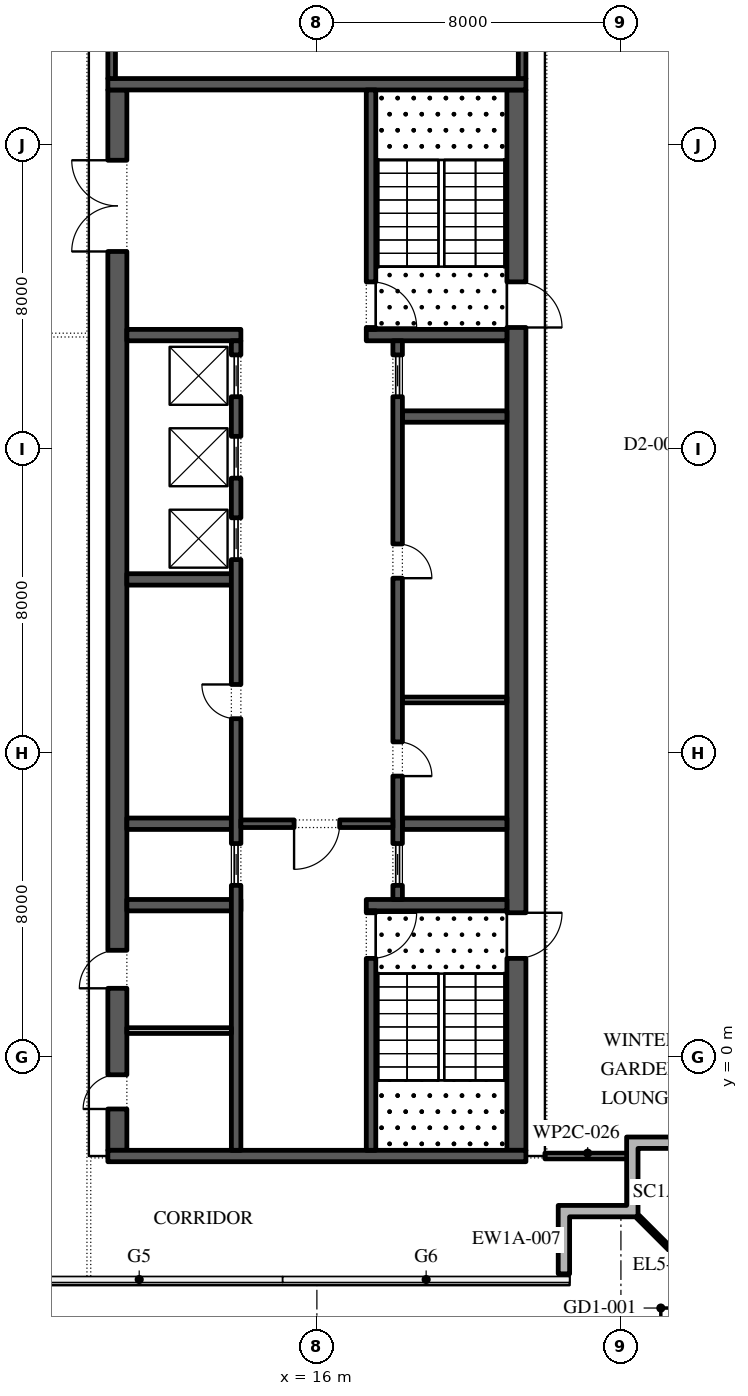
"""IFC4 building model, lengths in metres.
Left out: names, types, materials, properties, quantities, classifications, styles, units other than length and angle.
Written with IfcOpenShell. Run it as: python <this file> out.ifc"""

import sys

from ifc_helpers import new_model, si_unit, direction, frame, frame_2d, origin, place, context, subcontext, project, spatial, polyline, rectangle, outline, extrude, element, fill, save


model = new_model("IFC4")
c1 = context("Model", 3, precision=1e-05, world=origin(), true_north=direction((0.0, 1.0)))
c2 = subcontext(c1, "Body", "Model", "MODEL_VIEW")
j1 = project(units=[si_unit("LENGTHUNIT", "METRE"), si_unit("PLANEANGLEUNIT", "RADIAN")], contexts=[c1])
p1 = place(None, origin())
s1 = spatial("IfcSite", under=j1, at=p1, CompositionType="ELEMENT")
p2 = place(p1, origin())
s2 = spatial("IfcBuilding", under=s1, at=p2, CompositionType="ELEMENT")
p3 = place(p2, frame((0.0, 0.0, 303.0)))
s3 = spatial("IfcBuildingStorey", under=s2, at=p3, CompositionType="ELEMENT", Elevation=303.0)
p4 = place(p3, origin())
e1 = element("IfcWall", 1, at=p4, inside=s3, PredefinedType="STANDARD", context=c2, shape_type="SweptSolid", body=[
    extrude(outline(polyline([(24.15, -3.9), (24.15, -2.1), (26.25, -2.1), (26.25, -2.4), (24.45, -2.4), (24.45, -4.2), (22.65, -4.2), (22.65, -5.7), (22.35, -5.7), (22.35, -3.9), (24.15, -3.9)])), origin(), (0.0, 0.0, 1.0), 5.8),
])
p5 = place(p3, frame((24.45, -4.2, 0.0), z_axis=(0.0, 0.0, 1.0), x_axis=(0.707106781187, -0.707106781187, 0.0)))
e2 = element("IfcWall", 2, at=p5, inside=s3, PredefinedType="STANDARD", context=c2, shape_type="SweptSolid", body=[
    extrude(rectangle(XDim=2.667, YDim=0.1, at=frame_2d((1.333, 0.0))), origin(), (0.0, 0.0, 1.0), 5.8),
])
p6 = place(p3, frame((21.25, -2.45, 0.0), z_axis=(0.0, 0.0, 1.0), x_axis=(0.0, 1.0, 0.0)))
e3 = element("IfcWall", 3, at=p6, inside=s3, PredefinedType="SHEAR", context=c2, shape_type="SweptSolid", body=[
    extrude(rectangle(XDim=27.9, YDim=0.5, at=frame_2d((13.95, 0.0))), origin(), (0.0, 0.0, 1.0), 5.8),
])
p7 = place(p6, frame((5.05, 0.0, 0.0)))
e4 = element("IfcOpeningElement", 4, at=p7, cuts=e3, PredefinedType="OPENING", context=c2, shape_type="SweptSolid", body=[
    extrude(rectangle(XDim=1.2, YDim=2.1, at=frame_2d((0.6, 1.05))), frame((0.0, 0.26, 0.0), z_axis=(0.0, -1.0, 0.0), x_axis=(1.0, 0.0, 0.0)), (0.0, 0.0, 1.0), 0.52),
])
p8 = place(p6, frame((21.65, 0.0, 0.0)))
e5 = element("IfcOpeningElement", 5, at=p8, cuts=e3, PredefinedType="OPENING", context=c2, shape_type="SweptSolid", body=[
    extrude(rectangle(XDim=1.2, YDim=2.1, at=frame_2d((0.6, 1.05))), frame((0.0, 0.26, 0.0), z_axis=(0.0, -1.0, 0.0), x_axis=(1.0, 0.0, 0.0)), (0.0, 0.0, 1.0), 0.52),
])
p9 = place(p3, frame((10.75, -2.45, 0.0), z_axis=(0.0, 0.0, 1.0), x_axis=(0.0, 1.0, 0.0)))
e6 = element("IfcWall", 6, at=p9, inside=s3, PredefinedType="SHEAR", context=c2, shape_type="SweptSolid", body=[
    extrude(rectangle(XDim=27.9, YDim=0.5, at=frame_2d((13.95, 0.0))), origin(), (0.0, 0.0, 1.0), 5.8),
])
p10 = place(p9, frame((23.65, 0.0, 0.0)))
e7 = element("IfcOpeningElement", 7, at=p10, cuts=e6, PredefinedType="OPENING", context=c2, shape_type="SweptSolid", body=[
    extrude(rectangle(XDim=2.4, YDim=2.1, at=frame_2d((1.2, 1.05))), frame((0.0, 0.26, 0.0), z_axis=(0.0, -1.0, 0.0), x_axis=(1.0, 0.0, 0.0)), (0.0, 0.0, 1.0), 0.52),
])
p11 = place(p9, frame((1.087, 0.0, 0.0)))
e8 = element("IfcOpeningElement", 8, at=p11, cuts=e6, PredefinedType="OPENING", context=c2, shape_type="SweptSolid", body=[
    extrude(rectangle(XDim=0.9, YDim=2.1, at=frame_2d((0.45, 1.05))), frame((0.0, 0.26, 0.0), z_axis=(0.0, -1.0, 0.0), x_axis=(1.0, 0.0, 0.0)), (0.0, 0.0, 1.0), 0.52),
])
p12 = place(p9, frame((4.262, 0.0, 0.0)))
e9 = element("IfcOpeningElement", 9, at=p12, cuts=e6, PredefinedType="OPENING", context=c2, shape_type="SweptSolid", body=[
    extrude(rectangle(XDim=1.0, YDim=2.1, at=frame_2d((0.5, 1.05))), frame((0.0, 0.26, 0.0), z_axis=(0.0, -1.0, 0.0), x_axis=(1.0, 0.0, 0.0)), (0.0, 0.0, 1.0), 0.52),
])
for number, where, z_axis, x_axis in (
    (10, (10.5, -2.6, 0.0), (0.0, 0.0, 1.0), (1.0, 0.0, 0.0)),
    (11, (10.5, 25.6, 0.0), (0.0, 0.0, 1.0), (1.0, 0.0, 0.0)),
):
    element("IfcWall", number, at=place(p3, frame(where, z_axis=z_axis, x_axis=x_axis)), inside=s3, PredefinedType="SHEAR", context=c2, shape_type="SweptSolid", body=[
        extrude(rectangle(XDim=11.0, YDim=0.3, at=frame_2d((5.5, 0.0))), origin(), (0.0, 0.0, 1.0), 5.8),
    ])
p13 = place(p3, frame((17.3, 4.0, 0.0), z_axis=(0.0, 0.0, 1.0), x_axis=(1.0, 0.0, 0.0)))
e12 = element("IfcWall", 12, at=p13, inside=s3, PredefinedType="SHEAR", context=c2, shape_type="SweptSolid", body=[
    extrude(rectangle(XDim=3.7, YDim=0.3, at=frame_2d((1.85, 0.0))), origin(), (0.0, 0.0, 1.0), 5.8),
])
p14 = place(p3, frame((17.425, -2.45, 0.0), z_axis=(0.0, 0.0, 1.0), x_axis=(0.0, 1.0, 0.0)))
e13 = element("IfcWall", 13, at=p14, inside=s3, PredefinedType="SHEAR", context=c2, shape_type="SweptSolid", body=[
    extrude(rectangle(XDim=6.3, YDim=0.25, at=frame_2d((3.15, 0.0))), origin(), (0.0, 0.0, 1.0), 5.8),
])
p15 = place(p14, frame((5.05, 0.0, 0.0)))
e14 = element("IfcOpeningElement", 14, at=p15, cuts=e13, PredefinedType="OPENING", context=c2, shape_type="SweptSolid", body=[
    extrude(rectangle(XDim=1.2, YDim=2.1, at=frame_2d((0.6, 1.05))), frame((0.0, 0.135, 0.0), z_axis=(0.0, -1.0, 0.0), x_axis=(1.0, 0.0, 0.0)), (0.0, 0.0, 1.0), 0.27),
])
p16 = place(p3, frame((17.3, 19.0, 0.0), z_axis=(0.0, 0.0, 1.0), x_axis=(1.0, 0.0, 0.0)))
e15 = element("IfcWall", 15, at=p16, inside=s3, PredefinedType="SHEAR", context=c2, shape_type="SweptSolid", body=[
    extrude(rectangle(XDim=3.7, YDim=0.3, at=frame_2d((1.85, 0.0))), origin(), (0.0, 0.0, 1.0), 5.8),
])
p17 = place(p3, frame((17.425, 19.15, 0.0), z_axis=(0.0, 0.0, 1.0), x_axis=(0.0, 1.0, 0.0)))
e16 = element("IfcWall", 16, at=p17, inside=s3, PredefinedType="SHEAR", context=c2, shape_type="SweptSolid", body=[
    extrude(rectangle(XDim=6.3, YDim=0.25, at=frame_2d((3.15, 0.0))), origin(), (0.0, 0.0, 1.0), 5.8),
])
p18 = place(p17, frame((0.05, 0.0, 0.0)))
e17 = element("IfcOpeningElement", 17, at=p18, cuts=e16, PredefinedType="OPENING", context=c2, shape_type="SweptSolid", body=[
    extrude(rectangle(XDim=1.2, YDim=2.1, at=frame_2d((0.6, 1.05))), frame((0.0, 0.135, 0.0), z_axis=(0.0, -1.0, 0.0), x_axis=(1.0, 0.0, 0.0)), (0.0, 0.0, 1.0), 0.27),
])
for number, where, z_axis, x_axis in (
    (18, (18.25, 6.143, 0.0), (0.0, 0.0, 1.0), (1.0, 0.0, 0.0)),
    (19, (18.25, 16.857, 0.0), (0.0, 0.0, 1.0), (1.0, 0.0, 0.0)),
):
    element("IfcWall", number, at=place(p3, frame(where, z_axis=z_axis, x_axis=x_axis)), inside=s3, PredefinedType="SHEAR", context=c2, shape_type="SweptSolid", body=[
        extrude(rectangle(XDim=2.75, YDim=0.3, at=frame_2d((1.375, 0.0))), origin(), (0.0, 0.0, 1.0), 5.8),
    ])
p19 = place(p3, frame((18.125, 4.15, 0.0), z_axis=(0.0, 0.0, 1.0), x_axis=(0.0, 1.0, 0.0)))
e20 = element("IfcWall", 20, at=p19, inside=s3, PredefinedType="SHEAR", context=c2, shape_type="SweptSolid", body=[
    extrude(rectangle(XDim=14.7, YDim=0.25, at=frame_2d((7.35, 0.0))), origin(), (0.0, 0.0, 1.0), 5.8),
])
p20 = place(p19, frame((3.246, 0.0, 0.0)))
e21 = element("IfcOpeningElement", 21, at=p20, cuts=e20, PredefinedType="OPENING", context=c2, shape_type="SweptSolid", body=[
    extrude(rectangle(XDim=0.9, YDim=2.1, at=frame_2d((0.45, 1.05))), frame((0.0, 0.135, 0.0), z_axis=(0.0, -1.0, 0.0), x_axis=(1.0, 0.0, 0.0)), (0.0, 0.0, 1.0), 0.27),
])
p21 = place(p19, frame((8.454, 0.0, 0.0)))
e22 = element("IfcOpeningElement", 22, at=p21, cuts=e20, PredefinedType="OPENING", context=c2, shape_type="SweptSolid", body=[
    extrude(rectangle(XDim=0.9, YDim=2.1, at=frame_2d((0.45, 1.05))), frame((0.0, 0.135, 0.0), z_axis=(0.0, -1.0, 0.0), x_axis=(1.0, 0.0, 0.0)), (0.0, 0.0, 1.0), 0.27),
])
p22 = place(p19, frame((0.371, 0.0, 0.0)))
e23 = element("IfcOpeningElement", 23, at=p22, cuts=e20, PredefinedType="OPENING", context=c2, shape_type="SweptSolid", body=[
    extrude(rectangle(XDim=1.1, YDim=2.1, at=frame_2d((0.55, 1.05))), frame((0.0, 0.135, 0.0), z_axis=(0.0, -1.0, 0.0), x_axis=(1.0, 0.0, 0.0)), (0.0, 0.0, 1.0), 0.27),
])
p23 = place(p19, frame((13.229, 0.0, 0.0)))
e24 = element("IfcOpeningElement", 24, at=p23, cuts=e20, PredefinedType="OPENING", context=c2, shape_type="SweptSolid", body=[
    extrude(rectangle(XDim=1.1, YDim=2.1, at=frame_2d((0.55, 1.05))), frame((0.0, 0.135, 0.0), z_axis=(0.0, -1.0, 0.0), x_axis=(1.0, 0.0, 0.0)), (0.0, 0.0, 1.0), 0.27),
])
p24 = place(p3, frame((18.25, 9.4, 0.0), z_axis=(0.0, 0.0, 1.0), x_axis=(1.0, 0.0, 0.0)))
e25 = element("IfcWall", 25, at=p24, inside=s3, PredefinedType="PARTITIONING", context=c2, shape_type="SweptSolid", body=[
    extrude(rectangle(XDim=2.75, YDim=0.15, at=frame_2d((1.375, 0.0))), origin(), (0.0, 0.0, 1.0), 5.8),
])
p25 = place(p3, frame((11.0, 4.0, 0.0), z_axis=(0.0, 0.0, 1.0), x_axis=(1.0, 0.0, 0.0)))
e26 = element("IfcWall", 26, at=p25, inside=s3, PredefinedType="SHEAR", context=c2, shape_type="SweptSolid", body=[
    extrude(rectangle(XDim=3.0, YDim=0.3, at=frame_2d((1.5, 0.0))), origin(), (0.0, 0.0, 1.0), 5.8),
])
for number, where, z_axis, x_axis in (
    (27, (11.0, 6.143, 0.0), (0.0, 0.0, 1.0), (1.0, 0.0, 0.0)),
    (28, (11.0, 12.571, 0.0), (0.0, 0.0, 1.0), (1.0, 0.0, 0.0)),
):
    element("IfcWall", number, at=place(p3, frame(where, z_axis=z_axis, x_axis=x_axis)), inside=s3, PredefinedType="SHEAR", context=c2, shape_type="SweptSolid", body=[
        extrude(rectangle(XDim=2.75, YDim=0.3, at=frame_2d((1.375, 0.0))), origin(), (0.0, 0.0, 1.0), 5.8),
    ])
p26 = place(p3, frame((11.0, 19.0, 0.0), z_axis=(0.0, 0.0, 1.0), x_axis=(1.0, 0.0, 0.0)))
e29 = element("IfcWall", 29, at=p26, inside=s3, PredefinedType="SHEAR", context=c2, shape_type="SweptSolid", body=[
    extrude(rectangle(XDim=3.0, YDim=0.3, at=frame_2d((1.5, 0.0))), origin(), (0.0, 0.0, 1.0), 5.8),
])
p27 = place(p3, frame((13.875, -2.45, 0.0), z_axis=(0.0, 0.0, 1.0), x_axis=(0.0, 1.0, 0.0)))
e30 = element("IfcWall", 30, at=p27, inside=s3, PredefinedType="SHEAR", context=c2, shape_type="SweptSolid", body=[
    extrude(rectangle(XDim=21.3, YDim=0.25, at=frame_2d((10.65, 0.0))), origin(), (0.0, 0.0, 1.0), 5.8),
])
p28 = place(p27, frame((11.357, 0.0, 0.0)))
e31 = element("IfcOpeningElement", 31, at=p28, cuts=e30, PredefinedType="OPENING", context=c2, shape_type="SweptSolid", body=[
    extrude(rectangle(XDim=0.9, YDim=2.1, at=frame_2d((0.45, 1.05))), frame((0.0, 0.135, 0.0), z_axis=(0.0, -1.0, 0.0), x_axis=(1.0, 0.0, 0.0)), (0.0, 0.0, 1.0), 0.27),
])
p29 = place(p27, frame((6.971, 0.0, 0.0)))
e32 = element("IfcOpeningElement", 32, at=p29, cuts=e30, PredefinedType="OPENING", context=c2, shape_type="SweptSolid", body=[
    extrude(rectangle(XDim=1.1, YDim=2.1, at=frame_2d((0.55, 1.05))), frame((0.0, 0.135, 0.0), z_axis=(0.0, -1.0, 0.0), x_axis=(1.0, 0.0, 0.0)), (0.0, 0.0, 1.0), 0.27),
])
p30 = place(p27, frame((15.543, 0.0, 0.0)))
e33 = element("IfcOpeningElement", 33, at=p30, cuts=e30, PredefinedType="OPENING", context=c2, shape_type="SweptSolid", body=[
    extrude(rectangle(XDim=1.1, YDim=2.1, at=frame_2d((0.55, 1.05))), frame((0.0, 0.135, 0.0), z_axis=(0.0, -1.0, 0.0), x_axis=(1.0, 0.0, 0.0)), (0.0, 0.0, 1.0), 0.27),
])
p31 = place(p27, frame((17.686, 0.0, 0.0)))
e34 = element("IfcOpeningElement", 34, at=p31, cuts=e30, PredefinedType="OPENING", context=c2, shape_type="SweptSolid", body=[
    extrude(rectangle(XDim=1.1, YDim=2.1, at=frame_2d((0.55, 1.05))), frame((0.0, 0.135, 0.0), z_axis=(0.0, -1.0, 0.0), x_axis=(1.0, 0.0, 0.0)), (0.0, 0.0, 1.0), 0.27),
])
p32 = place(p27, frame((19.829, 0.0, 0.0)))
e35 = element("IfcOpeningElement", 35, at=p32, cuts=e30, PredefinedType="OPENING", context=c2, shape_type="SweptSolid", body=[
    extrude(rectangle(XDim=1.1, YDim=2.1, at=frame_2d((0.55, 1.05))), frame((0.0, 0.135, 0.0), z_axis=(0.0, -1.0, 0.0), x_axis=(1.0, 0.0, 0.0)), (0.0, 0.0, 1.0), 0.27),
])
p33 = place(p3, frame((14.0, 6.143, 0.0), z_axis=(0.0, 0.0, 1.0), x_axis=(1.0, 0.0, 0.0)))
e36 = element("IfcWall", 36, at=p33, inside=s3, PredefinedType="SHEAR", context=c2, shape_type="SweptSolid", body=[
    extrude(rectangle(XDim=4.0, YDim=0.2, at=frame_2d((2.0, 0.0))), origin(), (0.0, 0.0, 1.0), 5.8),
])
p34 = place(p33, frame((1.4, 0.0, 0.0)))
e37 = element("IfcOpeningElement", 37, at=p34, cuts=e36, PredefinedType="OPENING", context=c2, shape_type="SweptSolid", body=[
    extrude(rectangle(XDim=1.2, YDim=2.1, at=frame_2d((0.6, 1.05))), frame((0.0, 0.11, 0.0), z_axis=(0.0, -1.0, 0.0), x_axis=(1.0, 0.0, 0.0)), (0.0, 0.0, 1.0), 0.22),
])
p35 = place(p3, frame((11.0, 0.7, 0.0), z_axis=(0.0, 0.0, 1.0), x_axis=(1.0, 0.0, 0.0)))
e38 = element("IfcWall", 38, at=p35, inside=s3, PredefinedType="PARTITIONING", context=c2, shape_type="SweptSolid", body=[
    extrude(rectangle(XDim=2.75, YDim=0.15, at=frame_2d((1.375, 0.0))), origin(), (0.0, 0.0, 1.0), 5.8),
])
p36 = place(p3, frame((21.4, 25.75, 0.0), z_axis=(0.0, 0.0, 1.0), x_axis=(0.0, 1.0, 0.0)))
e39 = element("IfcWall", 39, at=p36, inside=s3, PredefinedType="SHEAR", context=c2, shape_type="SweptSolid", body=[
    extrude(rectangle(XDim=15.05, YDim=0.2, at=frame_2d((7.525, 0.0))), origin(), (0.0, 0.0, 1.0), 5.8),
])
p37 = place(p3, frame((10.6, 25.75, 0.0), z_axis=(0.0, 0.0, 1.0), x_axis=(0.0, 1.0, 0.0)))
e40 = element("IfcWall", 40, at=p37, inside=s3, PredefinedType="SHEAR", context=c2, shape_type="SweptSolid", body=[
    extrude(rectangle(XDim=15.05, YDim=0.2, at=frame_2d((7.525, 0.0))), origin(), (0.0, 0.0, 1.0), 5.8),
])
p38 = place(p37, frame((3.288, 0.0, 0.0)))
e41 = element("IfcOpeningElement", 41, at=p38, cuts=e40, PredefinedType="OPENING", context=c2, shape_type="SweptSolid", body=[
    extrude(rectangle(XDim=0.9, YDim=2.1, at=frame_2d((0.45, 1.05))), frame((0.0, 0.11, 0.0), z_axis=(0.0, -1.0, 0.0), x_axis=(1.0, 0.0, 0.0)), (0.0, 0.0, 1.0), 0.22),
])
p39 = place(p37, frame((10.887, 0.0, 0.0)))
e42 = element("IfcOpeningElement", 42, at=p39, cuts=e40, PredefinedType="OPENING", context=c2, shape_type="SweptSolid", body=[
    extrude(rectangle(XDim=0.9, YDim=2.1, at=frame_2d((0.45, 1.05))), frame((0.0, 0.11, 0.0), z_axis=(0.0, -1.0, 0.0), x_axis=(1.0, 0.0, 0.0)), (0.0, 0.0, 1.0), 0.22),
])
p40 = place(p3, frame((22.0, -2.6, 0.0), z_axis=(0.0, 0.0, 1.0), x_axis=(1.0, 0.0, 0.0)))
e43 = element("IfcWall", 43, at=p40, inside=s3, PredefinedType="PARTITIONING", context=c2, shape_type="SweptSolid", body=[
    extrude(rectangle(XDim=2.25, YDim=0.15, at=frame_2d((1.125, 0.0))), origin(), (0.0, 0.0, 1.0), 5.8),
])
p41 = place(p20, frame((0.9, -0.2, 0.0), z_axis=(0.0, 0.0, 1.0), x_axis=(-1.0, 0.0, 0.0)))
e44 = element("IfcDoor", 44, at=p41, inside=s3, OperationType="SINGLE_SWING_LEFT", PredefinedType="DOOR", context=c2, shape_type="SweptSolid", body=[
    extrude(rectangle(XDim=0.9, YDim=2.1, at=frame_2d((0.45, 1.05))), frame((0.0, -0.075, 0.0), z_axis=(0.0, -1.0, 0.0), x_axis=(1.0, 0.0, 0.0)), (0.0, 0.0, 1.0), 0.05),
])
fill(e21, e44)
p42 = place(p21, frame((0.9, -0.2, 0.0), z_axis=(0.0, 0.0, 1.0), x_axis=(-1.0, 0.0, 0.0)))
e45 = element("IfcDoor", 45, at=p42, inside=s3, OperationType="SINGLE_SWING_LEFT", PredefinedType="DOOR", context=c2, shape_type="SweptSolid", body=[
    extrude(rectangle(XDim=0.9, YDim=2.1, at=frame_2d((0.45, 1.05))), frame((0.0, -0.075, 0.0), z_axis=(0.0, -1.0, 0.0), x_axis=(1.0, 0.0, 0.0)), (0.0, 0.0, 1.0), 0.05),
])
fill(e22, e45)
p43 = place(p22, origin())
e46 = element("IfcDoor", 46, at=p43, inside=s3, OperationType="SLIDING_TO_LEFT", PredefinedType="DOOR", context=c2, shape_type="SweptSolid", body=[
    extrude(rectangle(XDim=1.1, YDim=2.1, at=frame_2d((0.55, 1.05))), frame((0.0, 0.025, 0.0), z_axis=(0.0, -1.0, 0.0), x_axis=(1.0, 0.0, 0.0)), (0.0, 0.0, 1.0), 0.05),
])
fill(e23, e46)
p44 = place(p23, origin())
e47 = element("IfcDoor", 47, at=p44, inside=s3, OperationType="SLIDING_TO_LEFT", PredefinedType="DOOR", context=c2, shape_type="SweptSolid", body=[
    extrude(rectangle(XDim=1.1, YDim=2.1, at=frame_2d((0.55, 1.05))), frame((0.0, 0.025, 0.0), z_axis=(0.0, -1.0, 0.0), x_axis=(1.0, 0.0, 0.0)), (0.0, 0.0, 1.0), 0.05),
])
fill(e24, e47)
p45 = place(p28, origin())
e48 = element("IfcDoor", 48, at=p45, inside=s3, OperationType="SINGLE_SWING_LEFT", PredefinedType="DOOR", context=c2, shape_type="SweptSolid", body=[
    extrude(rectangle(XDim=0.9, YDim=2.1, at=frame_2d((0.45, 1.05))), frame((0.0, 0.125, 0.0), z_axis=(0.0, -1.0, 0.0), x_axis=(1.0, 0.0, 0.0)), (0.0, 0.0, 1.0), 0.05),
])
fill(e31, e48)
p46 = place(p29, origin())
e49 = element("IfcDoor", 49, at=p46, inside=s3, OperationType="SLIDING_TO_LEFT", PredefinedType="DOOR", context=c2, shape_type="SweptSolid", body=[
    extrude(rectangle(XDim=1.1, YDim=2.1, at=frame_2d((0.55, 1.05))), frame((0.0, 0.025, 0.0), z_axis=(0.0, -1.0, 0.0), x_axis=(1.0, 0.0, 0.0)), (0.0, 0.0, 1.0), 0.05),
])
fill(e32, e49)
p47 = place(p30, origin())
e50 = element("IfcDoor", 50, at=p47, inside=s3, OperationType="SLIDING_TO_LEFT", PredefinedType="DOOR", context=c2, shape_type="SweptSolid", body=[
    extrude(rectangle(XDim=1.1, YDim=2.1, at=frame_2d((0.55, 1.05))), frame((0.0, 0.025, 0.0), z_axis=(0.0, -1.0, 0.0), x_axis=(1.0, 0.0, 0.0)), (0.0, 0.0, 1.0), 0.05),
])
fill(e33, e50)
p48 = place(p31, origin())
e51 = element("IfcDoor", 51, at=p48, inside=s3, OperationType="SLIDING_TO_LEFT", PredefinedType="DOOR", context=c2, shape_type="SweptSolid", body=[
    extrude(rectangle(XDim=1.1, YDim=2.1, at=frame_2d((0.55, 1.05))), frame((0.0, 0.025, 0.0), z_axis=(0.0, -1.0, 0.0), x_axis=(1.0, 0.0, 0.0)), (0.0, 0.0, 1.0), 0.05),
])
fill(e34, e51)
p49 = place(p32, origin())
e52 = element("IfcDoor", 52, at=p49, inside=s3, OperationType="SLIDING_TO_LEFT", PredefinedType="DOOR", context=c2, shape_type="SweptSolid", body=[
    extrude(rectangle(XDim=1.1, YDim=2.1, at=frame_2d((0.55, 1.05))), frame((0.0, 0.025, 0.0), z_axis=(0.0, -1.0, 0.0), x_axis=(1.0, 0.0, 0.0)), (0.0, 0.0, 1.0), 0.05),
])
fill(e35, e52)
p50 = place(p34, frame((1.2, 0.0, 0.0), z_axis=(0.0, 0.0, 1.0), x_axis=(-1.0, 0.0, 0.0)))
e53 = element("IfcDoor", 53, at=p50, inside=s3, OperationType="SINGLE_SWING_LEFT", PredefinedType="DOOR", context=c2, shape_type="SweptSolid", body=[
    extrude(rectangle(XDim=1.2, YDim=2.1, at=frame_2d((0.6, 1.05))), frame((0.0, 0.025, 0.0), z_axis=(0.0, -1.0, 0.0), x_axis=(1.0, 0.0, 0.0)), (0.0, 0.0, 1.0), 0.05),
])
fill(e37, e53)
p51 = place(p10, origin())
e54 = element("IfcDoor", 54, at=p51, inside=s3, OperationType="DOUBLE_DOOR_SINGLE_SWING", PredefinedType="DOOR", context=c2, shape_type="SweptSolid", body=[
    extrude(rectangle(XDim=2.4, YDim=2.1, at=frame_2d((1.2, 1.05))), frame((0.0, 0.025, 0.0), z_axis=(0.0, -1.0, 0.0), x_axis=(1.0, 0.0, 0.0)), (0.0, 0.0, 1.0), 0.05),
])
fill(e7, e54)
p52 = place(p15, frame((1.2, 0.0, 0.0), z_axis=(0.0, 0.0, 1.0), x_axis=(-1.0, 0.0, 0.0)))
e55 = element("IfcDoor", 55, at=p52, inside=s3, OperationType="SINGLE_SWING_RIGHT", PredefinedType="DOOR", context=c2, shape_type="SweptSolid", body=[
    extrude(rectangle(XDim=1.2, YDim=2.1, at=frame_2d((0.6, 1.05))), frame((0.0, 0.025, 0.0), z_axis=(0.0, -1.0, 0.0), x_axis=(1.0, 0.0, 0.0)), (0.0, 0.0, 1.0), 0.05),
])
fill(e14, e55)
p53 = place(p7, frame((1.2, 0.0, 0.0), z_axis=(0.0, 0.0, 1.0), x_axis=(-1.0, 0.0, 0.0)))
e56 = element("IfcDoor", 56, at=p53, inside=s3, OperationType="SINGLE_SWING_RIGHT", PredefinedType="DOOR", context=c2, shape_type="SweptSolid", body=[
    extrude(rectangle(XDim=1.2, YDim=2.1, at=frame_2d((0.6, 1.05))), frame((0.0, 0.025, 0.0), z_axis=(0.0, -1.0, 0.0), x_axis=(1.0, 0.0, 0.0)), (0.0, 0.0, 1.0), 0.05),
])
fill(e4, e56)
p54 = place(p18, frame((1.2, 0.0, 0.0), z_axis=(0.0, 0.0, 1.0), x_axis=(-1.0, 0.0, 0.0)))
e57 = element("IfcDoor", 57, at=p54, inside=s3, OperationType="SINGLE_SWING_LEFT", PredefinedType="DOOR", context=c2, shape_type="SweptSolid", body=[
    extrude(rectangle(XDim=1.2, YDim=2.1, at=frame_2d((0.6, 1.05))), frame((0.0, 0.025, 0.0), z_axis=(0.0, -1.0, 0.0), x_axis=(1.0, 0.0, 0.0)), (0.0, 0.0, 1.0), 0.05),
])
fill(e17, e57)
p55 = place(p8, frame((1.2, 0.0, 0.0), z_axis=(0.0, 0.0, 1.0), x_axis=(-1.0, 0.0, 0.0)))
e58 = element("IfcDoor", 58, at=p55, inside=s3, OperationType="SINGLE_SWING_LEFT", PredefinedType="DOOR", context=c2, shape_type="SweptSolid", body=[
    extrude(rectangle(XDim=1.2, YDim=2.1, at=frame_2d((0.6, 1.05))), frame((0.0, 0.025, 0.0), z_axis=(0.0, -1.0, 0.0), x_axis=(1.0, 0.0, 0.0)), (0.0, 0.0, 1.0), 0.05),
])
fill(e5, e58)
p56 = place(p11, origin())
e59 = element("IfcDoor", 59, at=p56, inside=s3, OperationType="SINGLE_SWING_RIGHT", PredefinedType="DOOR", context=c2, shape_type="SweptSolid", body=[
    extrude(rectangle(XDim=0.9, YDim=2.1, at=frame_2d((0.45, 1.05))), frame((0.0, -0.2, 0.0), z_axis=(0.0, -1.0, 0.0), x_axis=(1.0, 0.0, 0.0)), (0.0, 0.0, 1.0), 0.05),
])
fill(e8, e59)
p57 = place(p12, origin())
e60 = element("IfcDoor", 60, at=p57, inside=s3, OperationType="SINGLE_SWING_RIGHT", PredefinedType="DOOR", context=c2, shape_type="SweptSolid", body=[
    extrude(rectangle(XDim=1.0, YDim=2.1, at=frame_2d((0.5, 1.05))), frame((0.0, -0.2, 0.0), z_axis=(0.0, -1.0, 0.0), x_axis=(1.0, 0.0, 0.0)), (0.0, 0.0, 1.0), 0.05),
])
fill(e9, e60)
save(model, sys.argv[1])
